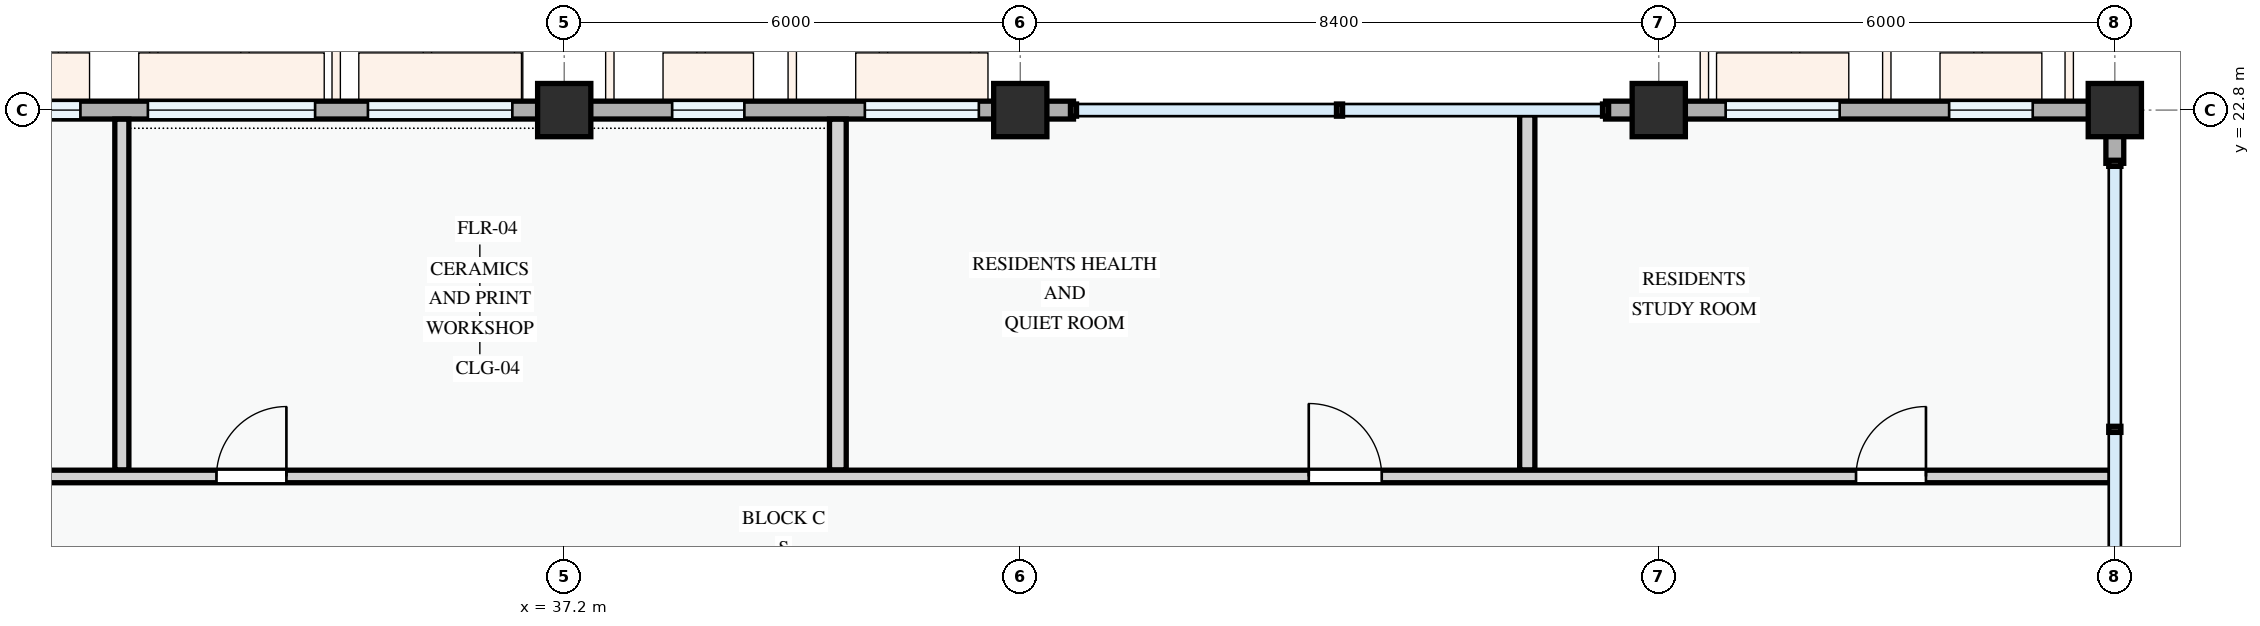
"""IFC4 building model, lengths in metres.
Left out: names, types, materials, properties, quantities, classifications, styles, units other than length and angle.
Written with IfcOpenShell. Run it as: python <this file> out.ifc"""

import sys

from ifc_helpers import new_model, si_unit, direction, frame, frame_2d, origin, origin_2d, place, context, subcontext, project, spatial, rectangle, extrude, element, fill, save


model = new_model("IFC4")
c1 = context("Model", 3, precision=1e-05, world=origin(), true_north=direction((0.0, 1.0)))
c2 = subcontext(c1, "Body", "Model", "MODEL_VIEW")
j1 = project(units=[si_unit("LENGTHUNIT", "METRE"), si_unit("PLANEANGLEUNIT", "RADIAN")], contexts=[c1])
p1 = place(None, origin())
s1 = spatial("IfcSite", under=j1, at=p1, CompositionType="ELEMENT")
p2 = place(p1, origin())
s2 = spatial("IfcBuilding", under=s1, at=p2, CompositionType="ELEMENT")
p3 = place(p2, frame((0.0, 0.0, 4.5)))
s3 = spatial("IfcBuildingStorey", under=s2, at=p3, CompositionType="ELEMENT", Elevation=4.5)
for number, where, z_axis, x_axis in (
    (1, (37.2, 22.8, 0.0), (0.0, 0.0, 1.0), (1.0, 0.0, 0.0)),
    (2, (43.2, 22.8, 0.0), (0.0, 0.0, 1.0), (1.0, 0.0, 0.0)),
    (3, (51.6, 22.8, 0.0), (0.0, 0.0, 1.0), (1.0, 0.0, 0.0)),
    (4, (57.6, 22.8, 0.0), (0.0, 0.0, 1.0), (1.0, 0.0, 0.0)),
):
    element("IfcColumn", number, at=place(p3, frame(where, z_axis=z_axis, x_axis=x_axis)), inside=s3, PredefinedType="COLUMN", context=c2, shape_type="SweptSolid", body=[
        extrude(rectangle(XDim=0.7, YDim=0.7, at=origin_2d()), origin(), (0.0, 0.0, 1.0), 3.6),
    ])
p4 = place(p3, frame((57.6, 22.1, 0.0), z_axis=(0.0, 0.0, 1.0), x_axis=(0.0, 1.0, 0.0)))
e5 = element("IfcWall", 5, at=p4, inside=s3, PredefinedType="STANDARD", context=c2, shape_type="SweptSolid", body=[
    extrude(rectangle(XDim=0.58, YDim=0.235, at=frame_2d((0.29, 0.0))), origin(), (0.0, 0.0, 1.0), 2.725),
])
p5 = place(p3, frame((57.6, 22.8, 0.0), z_axis=(0.0, 0.0, 1.0), x_axis=(-1.0, 0.0, 0.0)))
e6 = element("IfcWall", 6, at=p5, inside=s3, PredefinedType="STANDARD", context=c2, shape_type="SweptSolid", body=[
    extrude(rectangle(XDim=6.0, YDim=0.235, at=frame_2d((3.0, 0.0))), origin(), (0.0, 0.0, 1.0), 2.775),
])
p6 = place(p5, frame((1.08, 0.0, 0.78)))
e7 = element("IfcOpeningElement", 7, at=p6, cuts=e6, PredefinedType="OPENING", context=c2, shape_type="SweptSolid", body=[
    extrude(rectangle(XDim=1.1, YDim=1.3, at=frame_2d((0.55, 0.65))), frame((0.0, 0.127, 0.0), z_axis=(0.0, -1.0, 0.0), x_axis=(1.0, 0.0, 0.0)), (0.0, 0.0, 1.0), 0.255),
])
p7 = place(p5, frame((3.62, 0.0, 0.78)))
e8 = element("IfcOpeningElement", 8, at=p7, cuts=e6, PredefinedType="OPENING", context=c2, shape_type="SweptSolid", body=[
    extrude(rectangle(XDim=1.5, YDim=1.5, at=frame_2d((0.75, 0.75))), frame((0.0, 0.127, 0.0), z_axis=(0.0, -1.0, 0.0), x_axis=(1.0, 0.0, 0.0)), (0.0, 0.0, 1.0), 0.255),
])
p8 = place(p3, frame((51.6, 22.8, 0.0), z_axis=(0.0, 0.0, 1.0), x_axis=(-1.0, 0.0, 0.0)))
e9 = element("IfcWall", 9, at=p8, inside=s3, PredefinedType="STANDARD", context=c2, shape_type="SweptSolid", body=[
    extrude(rectangle(XDim=0.7, YDim=0.235, at=frame_2d((0.35, 0.0))), origin(), (0.0, 0.0, 1.0), 2.675),
])
p9 = place(p3, frame((43.9, 22.8, 0.0), z_axis=(0.0, 0.0, 1.0), x_axis=(-1.0, 0.0, 0.0)))
e10 = element("IfcWall", 10, at=p9, inside=s3, PredefinedType="STANDARD", context=c2, shape_type="SweptSolid", body=[
    extrude(rectangle(XDim=0.7, YDim=0.235, at=frame_2d((0.35, 0.0))), origin(), (0.0, 0.0, 1.0), 2.675),
])
p10 = place(p3, frame((43.2, 22.8, 0.0), z_axis=(0.0, 0.0, 1.0), x_axis=(-1.0, 0.0, 0.0)))
e11 = element("IfcWall", 11, at=p10, inside=s3, PredefinedType="STANDARD", context=c2, shape_type="SweptSolid", body=[
    extrude(rectangle(XDim=6.0, YDim=0.235, at=frame_2d((3.0, 0.0))), origin(), (0.0, 0.0, 1.0), 2.775),
])
p11 = place(p10, frame((0.545, 0.0, 0.78)))
e12 = element("IfcOpeningElement", 12, at=p11, cuts=e11, PredefinedType="OPENING", context=c2, shape_type="SweptSolid", body=[
    extrude(rectangle(XDim=1.5, YDim=1.65, at=frame_2d((0.75, 0.825))), frame((0.0, 0.127, 0.0), z_axis=(0.0, -1.0, 0.0), x_axis=(1.0, 0.0, 0.0)), (0.0, 0.0, 1.0), 0.255),
])
p12 = place(p10, frame((3.63, 0.0, 0.78)))
e13 = element("IfcOpeningElement", 13, at=p12, cuts=e11, PredefinedType="OPENING", context=c2, shape_type="SweptSolid", body=[
    extrude(rectangle(XDim=0.95, YDim=1.15, at=frame_2d((0.475, 0.575))), frame((0.0, 0.127, 0.0), z_axis=(0.0, -1.0, 0.0), x_axis=(1.0, 0.0, 0.0)), (0.0, 0.0, 1.0), 0.255),
])
p13 = place(p3, frame((37.2, 22.8, 0.0), z_axis=(0.0, 0.0, 1.0), x_axis=(-1.0, 0.0, 0.0)))
e14 = element("IfcWall", 14, at=p13, inside=s3, PredefinedType="STANDARD", context=c2, shape_type="SweptSolid", body=[
    extrude(rectangle(XDim=8.4, YDim=0.235, at=frame_2d((4.2, 0.0))), origin(), (0.0, 0.0, 1.0), 2.675),
])
p14 = place(p13, frame((0.683, 0.0, 0.78)))
e15 = element("IfcOpeningElement", 15, at=p14, cuts=e14, PredefinedType="OPENING", context=c2, shape_type="SweptSolid", body=[
    extrude(rectangle(XDim=1.9, YDim=1.55, at=frame_2d((0.95, 0.775))), frame((0.0, 0.127, 0.0), z_axis=(0.0, -1.0, 0.0), x_axis=(1.0, 0.0, 0.0)), (0.0, 0.0, 1.0), 0.255),
])
p15 = place(p13, frame((3.278, 0.0, 0.78)))
e16 = element("IfcOpeningElement", 16, at=p15, cuts=e14, PredefinedType="OPENING", context=c2, shape_type="SweptSolid", body=[
    extrude(rectangle(XDim=2.2, YDim=1.5, at=frame_2d((1.1, 0.75))), frame((0.0, 0.127, 0.0), z_axis=(0.0, -1.0, 0.0), x_axis=(1.0, 0.0, 0.0)), (0.0, 0.0, 1.0), 0.255),
])
p16 = place(p13, frame((6.365, 0.0, 0.78)))
e17 = element("IfcOpeningElement", 17, at=p16, cuts=e14, PredefinedType="OPENING", context=c2, shape_type="SweptSolid", body=[
    extrude(rectangle(XDim=1.3, YDim=1.4, at=frame_2d((0.65, 0.7))), frame((0.0, 0.127, 0.0), z_axis=(0.0, -1.0, 0.0), x_axis=(1.0, 0.0, 0.0)), (0.0, 0.0, 1.0), 0.255),
])
p17 = place(p3, frame((31.38, 18.064, 0.0), z_axis=(0.0, 0.0, 1.0), x_axis=(0.0, 1.0, 0.0)))
e18 = element("IfcWall", 18, at=p17, inside=s3, PredefinedType="PARTITIONING", context=c2, shape_type="SweptSolid", body=[
    extrude(rectangle(XDim=4.616, YDim=0.185, at=frame_2d((2.308, 0.0))), origin(), (0.0, 0.0, 1.0), 3.3),
])
p18 = place(p3, frame((40.8, 18.064, 0.0), z_axis=(0.0, 0.0, 1.0), x_axis=(0.0, 1.0, 0.0)))
e19 = element("IfcWall", 19, at=p18, inside=s3, PredefinedType="PARTITIONING", context=c2, shape_type="SweptSolid", body=[
    extrude(rectangle(XDim=4.616, YDim=0.22, at=frame_2d((2.308, 0.0))), origin(), (0.0, 0.0, 1.0), 3.3),
])
p19 = place(p3, frame((49.87, 18.064, 0.0), z_axis=(0.0, 0.0, 1.0), x_axis=(0.0, 1.0, 0.0)))
e20 = element("IfcWall", 20, at=p19, inside=s3, PredefinedType="PARTITIONING", context=c2, shape_type="SweptSolid", body=[
    extrude(rectangle(XDim=4.676, YDim=0.2, at=frame_2d((2.338, 0.0))), origin(), (0.0, 0.0, 1.0), 3.3),
])
p20 = place(p3, frame((22.66, 17.98, 0.0), z_axis=(0.0, 0.0, 1.0), x_axis=(1.0, 0.0, 0.0)))
e21 = element("IfcWall", 21, at=p20, inside=s3, PredefinedType="PARTITIONING", context=c2, shape_type="SweptSolid", body=[
    extrude(rectangle(XDim=34.88, YDim=0.165, at=frame_2d((17.44, 0.0))), origin(), (0.0, 0.0, 1.0), 3.3),
])
p21 = place(p20, frame((2.746, 0.0, 0.0)))
e22 = element("IfcOpeningElement", 22, at=p21, cuts=e21, PredefinedType="OPENING", context=c2, shape_type="SweptSolid", body=[
    extrude(rectangle(XDim=0.92, YDim=2.1, at=frame_2d((0.46, 1.05))), frame((0.0, 0.093, 0.0), z_axis=(0.0, -1.0, 0.0), x_axis=(1.0, 0.0, 0.0)), (0.0, 0.0, 1.0), 0.185),
])
p22 = place(p20, frame((9.965, 0.0, 0.0)))
e23 = element("IfcOpeningElement", 23, at=p22, cuts=e21, PredefinedType="OPENING", context=c2, shape_type="SweptSolid", body=[
    extrude(rectangle(XDim=0.92, YDim=2.1, at=frame_2d((0.46, 1.05))), frame((0.0, 0.093, 0.0), z_axis=(0.0, -1.0, 0.0), x_axis=(1.0, 0.0, 0.0)), (0.0, 0.0, 1.0), 0.185),
])
p23 = place(p20, frame((24.335, 0.0, 0.0)))
e24 = element("IfcOpeningElement", 24, at=p23, cuts=e21, PredefinedType="OPENING", context=c2, shape_type="SweptSolid", body=[
    extrude(rectangle(XDim=0.96, YDim=2.12, at=frame_2d((0.48, 1.06))), frame((0.0, 0.093, 0.0), z_axis=(0.0, -1.0, 0.0), x_axis=(1.0, 0.0, 0.0)), (0.0, 0.0, 1.0), 0.185),
])
p24 = place(p20, frame((31.535, 0.0, 0.0)))
e25 = element("IfcOpeningElement", 25, at=p24, cuts=e21, PredefinedType="OPENING", context=c2, shape_type="SweptSolid", body=[
    extrude(rectangle(XDim=0.92, YDim=2.1, at=frame_2d((0.46, 1.05))), frame((0.0, 0.093, 0.0), z_axis=(0.0, -1.0, 0.0), x_axis=(1.0, 0.0, 0.0)), (0.0, 0.0, 1.0), 0.185),
])
p25 = place(p6, origin())
e26 = element("IfcWindow", 26, at=p25, inside=s3, PartitioningType="SINGLE_PANEL", PredefinedType="WINDOW", context=c2, shape_type="SweptSolid", body=[
    extrude(rectangle(XDim=1.1, YDim=1.3, at=frame_2d((0.55, 0.65))), frame((0.0, 0.03, 0.0), z_axis=(0.0, -1.0, 0.0), x_axis=(1.0, 0.0, 0.0)), (0.0, 0.0, 1.0), 0.06),
])
fill(e7, e26)
p26 = place(p7, origin())
e27 = element("IfcWindow", 27, at=p26, inside=s3, PartitioningType="SINGLE_PANEL", PredefinedType="WINDOW", context=c2, shape_type="SweptSolid", body=[
    extrude(rectangle(XDim=1.5, YDim=1.5, at=frame_2d((0.75, 0.75))), frame((0.0, 0.03, 0.0), z_axis=(0.0, -1.0, 0.0), x_axis=(1.0, 0.0, 0.0)), (0.0, 0.0, 1.0), 0.06),
])
fill(e8, e27)
p27 = place(p11, origin())
e28 = element("IfcWindow", 28, at=p27, inside=s3, PartitioningType="SINGLE_PANEL", PredefinedType="WINDOW", context=c2, shape_type="SweptSolid", body=[
    extrude(rectangle(XDim=1.5, YDim=1.65, at=frame_2d((0.75, 0.825))), frame((0.0, 0.03, 0.0), z_axis=(0.0, -1.0, 0.0), x_axis=(1.0, 0.0, 0.0)), (0.0, 0.0, 1.0), 0.06),
])
fill(e12, e28)
p28 = place(p12, origin())
e29 = element("IfcWindow", 29, at=p28, inside=s3, PartitioningType="SINGLE_PANEL", PredefinedType="WINDOW", context=c2, shape_type="SweptSolid", body=[
    extrude(rectangle(XDim=0.95, YDim=1.15, at=frame_2d((0.475, 0.575))), frame((0.0, 0.03, 0.0), z_axis=(0.0, -1.0, 0.0), x_axis=(1.0, 0.0, 0.0)), (0.0, 0.0, 1.0), 0.06),
])
fill(e13, e29)
p29 = place(p14, origin())
e30 = element("IfcWindow", 30, at=p29, inside=s3, PartitioningType="DOUBLE_PANEL_VERTICAL", PredefinedType="WINDOW", context=c2, shape_type="SweptSolid", body=[
    extrude(rectangle(XDim=1.9, YDim=1.55, at=frame_2d((0.95, 0.775))), frame((0.0, 0.03, 0.0), z_axis=(0.0, -1.0, 0.0), x_axis=(1.0, 0.0, 0.0)), (0.0, 0.0, 1.0), 0.06),
])
fill(e15, e30)
p30 = place(p15, origin())
e31 = element("IfcWindow", 31, at=p30, inside=s3, PartitioningType="DOUBLE_PANEL_VERTICAL", PredefinedType="WINDOW", context=c2, shape_type="SweptSolid", body=[
    extrude(rectangle(XDim=2.2, YDim=1.5, at=frame_2d((1.1, 0.75))), frame((0.0, 0.03, 0.0), z_axis=(0.0, -1.0, 0.0), x_axis=(1.0, 0.0, 0.0)), (0.0, 0.0, 1.0), 0.06),
])
fill(e16, e31)
p31 = place(p16, origin())
e32 = element("IfcWindow", 32, at=p31, inside=s3, PartitioningType="SINGLE_PANEL", PredefinedType="WINDOW", context=c2, shape_type="SweptSolid", body=[
    extrude(rectangle(XDim=1.3, YDim=1.4, at=frame_2d((0.65, 0.7))), frame((0.0, 0.03, 0.0), z_axis=(0.0, -1.0, 0.0), x_axis=(1.0, 0.0, 0.0)), (0.0, 0.0, 1.0), 0.06),
])
fill(e17, e32)
p32 = place(p22, origin())
e33 = element("IfcDoor", 33, at=p32, inside=s3, OperationType="SINGLE_SWING_RIGHT", PredefinedType="DOOR", context=c2, shape_type="SweptSolid", body=[
    extrude(rectangle(XDim=0.92, YDim=2.1, at=frame_2d((0.46, 1.05))), frame((0.0, 0.025, 0.0), z_axis=(0.0, -1.0, 0.0), x_axis=(1.0, 0.0, 0.0)), (0.0, 0.0, 1.0), 0.05),
])
fill(e23, e33)
p33 = place(p23, origin())
e34 = element("IfcDoor", 34, at=p33, inside=s3, OperationType="SINGLE_SWING_LEFT", PredefinedType="DOOR", context=c2, shape_type="SweptSolid", body=[
    extrude(rectangle(XDim=0.96, YDim=2.12, at=frame_2d((0.48, 1.06))), frame((0.0, 0.025, 0.0), z_axis=(0.0, -1.0, 0.0), x_axis=(1.0, 0.0, 0.0)), (0.0, 0.0, 1.0), 0.05),
])
fill(e24, e34)
p34 = place(p24, origin())
e35 = element("IfcDoor", 35, at=p34, inside=s3, OperationType="SINGLE_SWING_RIGHT", PredefinedType="DOOR", context=c2, shape_type="SweptSolid", body=[
    extrude(rectangle(XDim=0.92, YDim=2.1, at=frame_2d((0.46, 1.05))), frame((0.0, 0.025, 0.0), z_axis=(0.0, -1.0, 0.0), x_axis=(1.0, 0.0, 0.0)), (0.0, 0.0, 1.0), 0.05),
])
fill(e25, e35)
save(model, sys.argv[1])
